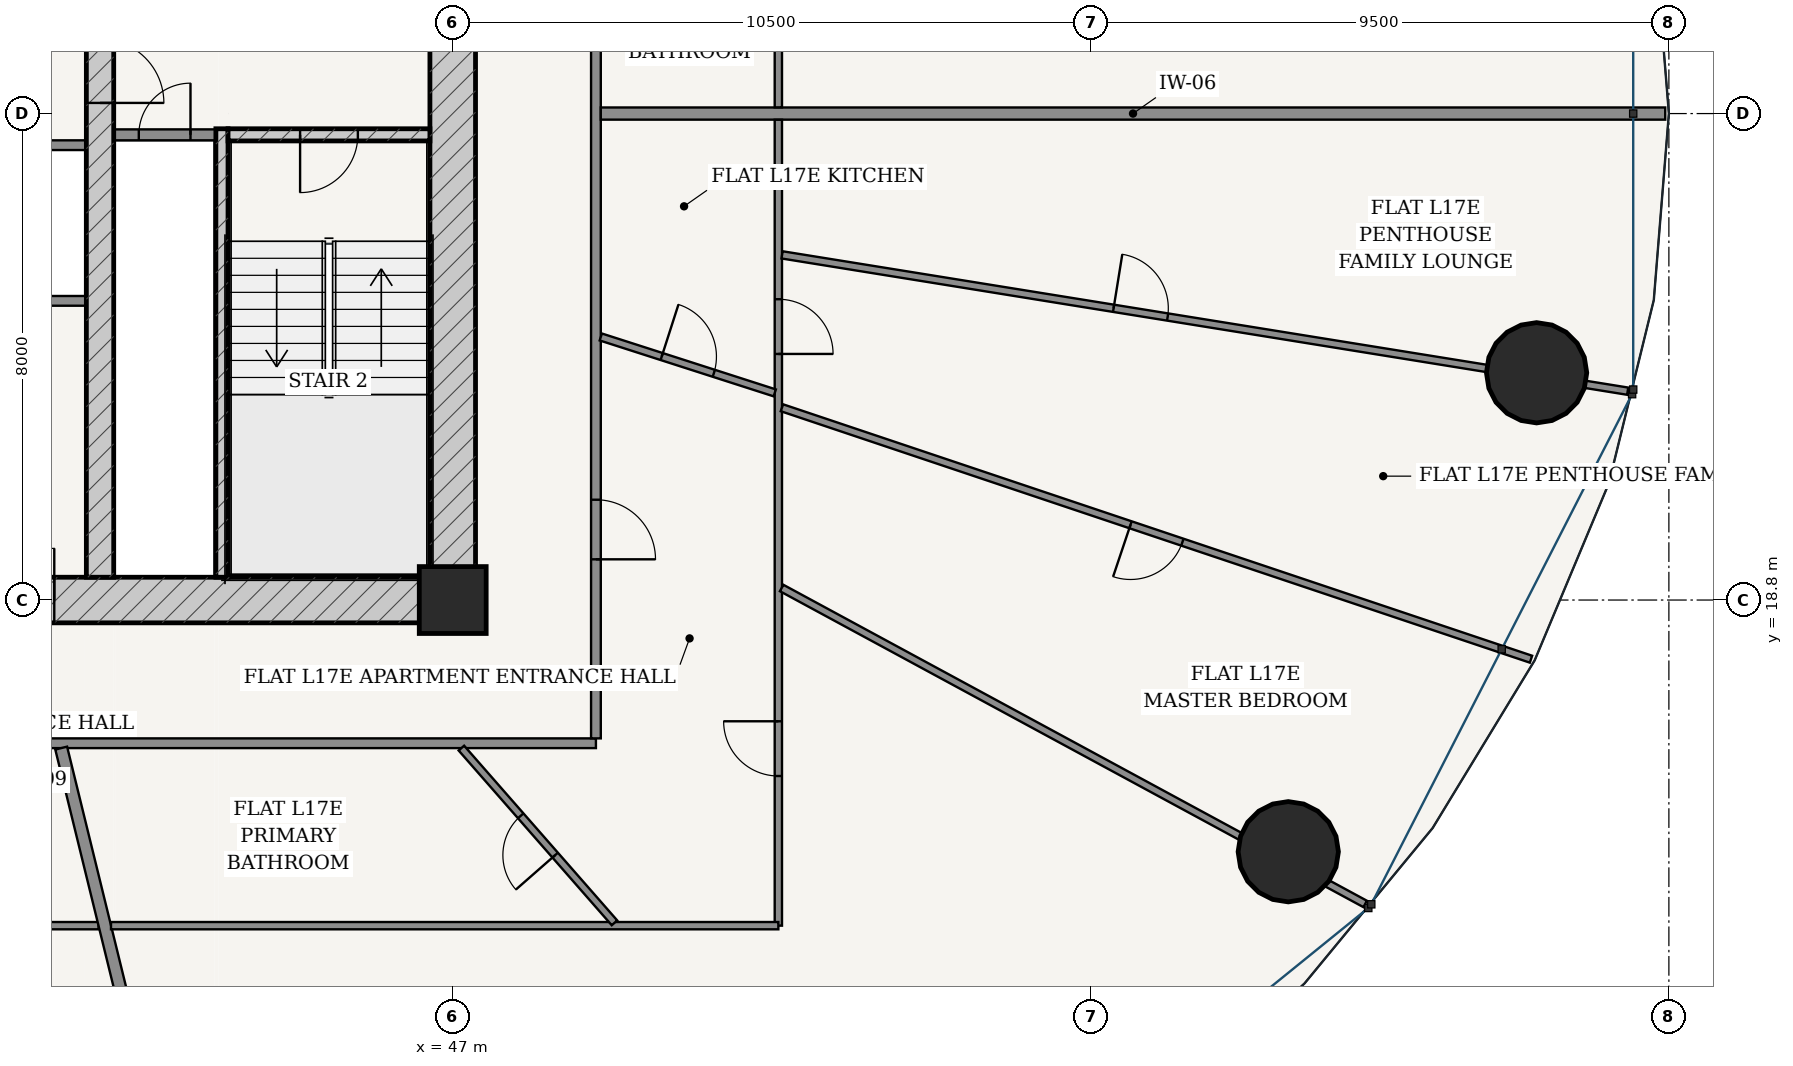
"""IFC4 building model, lengths in metres.
Left out: names, types, materials, properties, quantities, classifications, styles, units other than length and angle.
Written with IfcOpenShell. Run it as: python <this file> out.ifc"""

import sys

from ifc_helpers import new_model, si_unit, direction, frame, frame_2d, origin, origin_2d, place, context, subcontext, project, spatial, rectangle, hollow_circle, extrude, source, transform, mapped, element, fill, save


model = new_model("IFC4")
c1 = context("Model", 3, precision=1e-05, world=origin(), true_north=direction((-0.2419218956, 0.970295726276)))
c2 = subcontext(c1, "Body", "Model", "MODEL_VIEW")
j1 = project(units=[si_unit("LENGTHUNIT", "METRE"), si_unit("PLANEANGLEUNIT", "RADIAN")], contexts=[c1])
p1 = place(None, origin())
s1 = spatial("IfcSite", under=j1, at=p1, CompositionType="ELEMENT")
p2 = place(p1, origin())
s2 = spatial("IfcBuilding", under=s1, at=p2, CompositionType="ELEMENT")
p3 = place(p2, frame((0.0, 0.0, 67.2)))
s3 = spatial("IfcBuildingStorey", under=s2, at=p3, CompositionType="ELEMENT", Elevation=67.2)
p4 = place(p3, frame((47.0, 18.8, 0.0), z_axis=(0.0, 0.0, 1.0), x_axis=(1.0, 0.0, 0.0)))
e1 = element("IfcColumn", 1, at=p4, inside=s3, PredefinedType="COLUMN", context=c2, shape_type="SweptSolid", body=[
    extrude(rectangle(XDim=1.1, YDim=1.1, at=origin_2d()), origin(), (0.0, 0.0, 1.0), 3.6),
])
p5 = place(p3, frame((28.625, 18.8, 0.0), z_axis=(0.0, 0.0, 1.0), x_axis=(1.0, 0.0, 0.0)))
e2 = element("IfcWall", 2, at=p5, inside=s3, PredefinedType="SHEAR", context=c2, shape_type="SweptSolid", body=[
    extrude(rectangle(XDim=18.75, YDim=0.75, at=frame_2d((9.375, 0.0))), origin(), (0.0, 0.0, 1.0), 3.32),
])
p6 = place(p5, frame((6.927, 0.0, 0.0)))
e3 = element("IfcOpeningElement", 3, at=p6, cuts=e2, PredefinedType="OPENING", context=c2, shape_type="SweptSolid", body=[
    extrude(rectangle(XDim=0.85, YDim=2.1, at=frame_2d((0.425, 1.05))), frame((0.0, 0.385, 0.0), z_axis=(0.0, -1.0, 0.0), x_axis=(1.0, 0.0, 0.0)), (0.0, 0.0, 1.0), 0.77),
])
p7 = place(p5, frame((8.95, 0.0, 0.0)))
e4 = element("IfcOpeningElement", 4, at=p7, cuts=e2, PredefinedType="OPENING", context=c2, shape_type="SweptSolid", body=[
    extrude(rectangle(XDim=0.85, YDim=2.1, at=frame_2d((0.425, 1.05))), frame((0.0, 0.385, 0.0), z_axis=(0.0, -1.0, 0.0), x_axis=(1.0, 0.0, 0.0)), (0.0, 0.0, 1.0), 0.77),
])
p8 = place(p5, frame((10.972, 0.0, 0.0)))
e5 = element("IfcOpeningElement", 5, at=p8, cuts=e2, PredefinedType="OPENING", context=c2, shape_type="SweptSolid", body=[
    extrude(rectangle(XDim=0.85, YDim=2.1, at=frame_2d((0.425, 1.05))), frame((0.0, 0.385, 0.0), z_axis=(0.0, -1.0, 0.0), x_axis=(1.0, 0.0, 0.0)), (0.0, 0.0, 1.0), 0.77),
])
p9 = place(p3, frame((47.0, 19.175, 0.0), z_axis=(0.0, 0.0, 1.0), x_axis=(0.0, 1.0, 0.0)))
e6 = element("IfcWall", 6, at=p9, inside=s3, PredefinedType="SHEAR", context=c2, shape_type="SweptSolid", body=[
    extrude(rectangle(XDim=15.25, YDim=0.75, at=frame_2d((7.625, 0.0))), origin(), (0.0, 0.0, 1.0), 3.32),
])
p10 = place(p9, frame((9.875, 0.0, 0.0)))
e7 = element("IfcOpeningElement", 7, at=p10, cuts=e6, PredefinedType="OPENING", context=c2, shape_type="SweptSolid", body=[
    extrude(rectangle(XDim=1.5, YDim=2.2, at=frame_2d((0.75, 1.1))), frame((0.0, 0.385, 0.0), z_axis=(0.0, -1.0, 0.0), x_axis=(1.0, 0.0, 0.0)), (0.0, 0.0, 1.0), 0.77),
])
p11 = place(p3, frame((43.205, 19.175, 0.0), z_axis=(0.0, 0.0, 1.0), x_axis=(0.0, 1.0, 0.0)))
e8 = element("IfcWall", 8, at=p11, inside=s3, PredefinedType="SOLIDWALL", context=c2, shape_type="SweptSolid", body=[
    extrude(rectangle(XDim=7.375, YDim=0.2, at=frame_2d((3.688, 0.0))), origin(), (0.0, 0.0, 1.0), 3.32),
])
p12 = place(p3, frame((43.305, 26.45, 0.0), z_axis=(0.0, 0.0, 1.0), x_axis=(1.0, 0.0, 0.0)))
e9 = element("IfcWall", 9, at=p12, inside=s3, PredefinedType="SOLIDWALL", context=c2, shape_type="SweptSolid", body=[
    extrude(rectangle(XDim=3.32, YDim=0.2, at=frame_2d((1.66, 0.0))), origin(), (0.0, 0.0, 1.0), 3.32),
])
p13 = place(p12, frame((1.185, 0.0, 0.0)))
e10 = element("IfcOpeningElement", 10, at=p13, cuts=e9, PredefinedType="OPENING", context=c2, shape_type="SweptSolid", body=[
    extrude(rectangle(XDim=0.95, YDim=2.15, at=frame_2d((0.475, 1.075))), frame((0.0, 0.11, 0.0), z_axis=(0.0, -1.0, 0.0), x_axis=(1.0, 0.0, 0.0)), (0.0, 0.0, 1.0), 0.22),
])
p14 = place(p3, frame((41.2, 19.175, 0.0), z_axis=(0.0, 0.0, 1.0), x_axis=(0.0, 1.0, 0.0)))
e11 = element("IfcWall", 11, at=p14, inside=s3, PredefinedType="SHEAR", context=c2, shape_type="SweptSolid", body=[
    extrude(rectangle(XDim=15.25, YDim=0.45, at=frame_2d((7.625, 0.0))), origin(), (0.0, 0.0, 1.0), 3.32),
])
p15 = place(p14, frame((7.8, 0.0, 0.0)))
e12 = element("IfcOpeningElement", 12, at=p15, cuts=e11, PredefinedType="OPENING", context=c2, shape_type="SweptSolid", body=[
    extrude(rectangle(XDim=1.05, YDim=2.15, at=frame_2d((0.525, 1.075))), frame((0.0, 0.235, 0.0), z_axis=(0.0, -1.0, 0.0), x_axis=(1.0, 0.0, 0.0)), (0.0, 0.0, 1.0), 0.47),
])
for number, where, z_axis, x_axis in (
    (13, (60.741, 14.661, 0.0), (0.0, 0.0, 1.0), (1.0, 0.0, 0.0)),
    (14, (64.824, 22.537, 0.0), (0.0, 0.0, 1.0), (1.0, 0.0, 0.0)),
):
    element("IfcColumn", number, at=place(p3, frame(where, z_axis=z_axis, x_axis=x_axis)), inside=s3, PredefinedType="COLUMN", context=c2, shape_type="SweptSolid", body=[
        extrude(hollow_circle(Radius=0.825, WallThickness=0.05, at=origin_2d()), origin(), (0.0, 0.0, 1.0), 3.6),
    ])
p16 = place(p3, frame((41.425, 26.45, 0.0), z_axis=(0.0, 0.0, 1.0), x_axis=(1.0, 0.0, 0.0)))
e15 = element("IfcWall", 15, at=p16, inside=s3, PredefinedType="PARTITIONING", context=c2, shape_type="SweptSolid", body=[
    extrude(rectangle(XDim=1.675, YDim=0.18, at=frame_2d((0.837, 0.0))), origin(), (0.0, 0.0, 1.0), 3.32),
])
p17 = place(p16, frame((0.413, 0.0, 0.0)))
e16 = element("IfcOpeningElement", 16, at=p17, cuts=e15, PredefinedType="OPENING", context=c2, shape_type="SweptSolid", body=[
    extrude(rectangle(XDim=0.85, YDim=2.1, at=frame_2d((0.425, 1.05))), frame((0.0, 0.1, 0.0), z_axis=(0.0, -1.0, 0.0), x_axis=(1.0, 0.0, 0.0)), (0.0, 0.0, 1.0), 0.2),
])
for number, where, z_axis, x_axis in (
    (17, (35.025, 26.28, 0.0), (0.0, 0.0, 1.0), (1.0, 0.0, 0.0)),
    (18, (35.025, 23.72, 0.0), (0.0, 0.0, 1.0), (1.0, 0.0, 0.0)),
):
    element("IfcWall", number, at=place(p3, frame(where, z_axis=z_axis, x_axis=x_axis)), inside=s3, PredefinedType="PARTITIONING", context=c2, shape_type="SweptSolid", body=[
        extrude(rectangle(XDim=5.95, YDim=0.16, at=frame_2d((2.975, 0.0))), origin(), (0.0, 0.0, 1.0), 3.32),
    ])
p18 = place(p3, frame((26.645, 16.445, 0.0), z_axis=(0.0, 0.0, 1.0), x_axis=(1.0, 0.0, 0.0)))
e19 = element("IfcWall", 19, at=p18, inside=s3, PredefinedType="PARTITIONING", context=c2, shape_type="SweptSolid", body=[
    extrude(rectangle(XDim=22.71, YDim=0.16, at=frame_2d((11.355, 0.0))), origin(), (0.0, 0.0, 1.0), 2.688),
])
p19 = place(p18, frame((5.419, 0.0, 0.0)))
e20 = element("IfcOpeningElement", 20, at=p19, cuts=e19, PredefinedType="OPENING", context=c2, shape_type="SweptSolid", body=[
    extrude(rectangle(XDim=0.98, YDim=2.2, at=frame_2d((0.49, 1.1))), frame((0.0, 0.09, 0.0), z_axis=(0.0, -1.0, 0.0), x_axis=(1.0, 0.0, 0.0)), (0.0, 0.0, 1.0), 0.18),
])
p20 = place(p3, frame((49.355, 16.525, 0.0), z_axis=(0.0, 0.0, 1.0), x_axis=(0.0, 1.0, 0.0)))
e21 = element("IfcWall", 21, at=p20, inside=s3, PredefinedType="PARTITIONING", context=c2, shape_type="SweptSolid", body=[
    extrude(rectangle(XDim=20.55, YDim=0.16, at=frame_2d((10.275, 0.0))), origin(), (0.0, 0.0, 1.0), 2.688),
])
p21 = place(p20, frame((16.537, 0.0, 0.0)))
e22 = element("IfcOpeningElement", 22, at=p21, cuts=e21, PredefinedType="OPENING", context=c2, shape_type="SweptSolid", body=[
    extrude(rectangle(XDim=0.98, YDim=2.2, at=frame_2d((0.49, 1.1))), frame((0.0, 0.09, 0.0), z_axis=(0.0, -1.0, 0.0), x_axis=(1.0, 0.0, 0.0)), (0.0, 0.0, 1.0), 0.18),
])
p22 = place(p20, frame((2.945, 0.0, 0.0)))
e23 = element("IfcOpeningElement", 23, at=p22, cuts=e21, PredefinedType="OPENING", context=c2, shape_type="SweptSolid", body=[
    extrude(rectangle(XDim=0.98, YDim=2.2, at=frame_2d((0.49, 1.1))), frame((0.0, 0.09, 0.0), z_axis=(0.0, -1.0, 0.0), x_axis=(1.0, 0.0, 0.0)), (0.0, 0.0, 1.0), 0.18),
])
p23 = place(p3, frame((49.435, 26.8, 0.0), z_axis=(0.0, 0.0, 1.0), x_axis=(1.0, 0.0, 0.0)))
e24 = element("IfcWall", 24, at=p23, inside=s3, PredefinedType="PARTITIONING", context=c2, shape_type="SweptSolid", body=[
    extrude(rectangle(XDim=17.505, YDim=0.2, at=frame_2d((8.752, 0.0))), origin(), (0.0, 0.0, 1.0), 2.762),
])
p24 = place(p3, frame((52.355, 40.155, 0.0), z_axis=(0.0, 0.0, 1.0), x_axis=(0.0, -1.0, 0.0)))
e25 = element("IfcWall", 25, at=p24, inside=s3, PredefinedType="PARTITIONING", context=c2, shape_type="SweptSolid", body=[
    extrude(rectangle(XDim=13.253, YDim=0.12, at=frame_2d((6.626, 0.0))), origin(), (0.0, 0.0, 1.0), 2.688),
])
p25 = place(p24, frame((6.853, 0.0, 0.0)))
e26 = element("IfcOpeningElement", 26, at=p25, cuts=e25, PredefinedType="OPENING", context=c2, shape_type="SweptSolid", body=[
    extrude(rectangle(XDim=0.9, YDim=2.15, at=frame_2d((0.45, 1.075))), frame((0.0, 0.07, 0.0), z_axis=(0.0, -1.0, 0.0), x_axis=(1.0, 0.0, 0.0)), (0.0, 0.0, 1.0), 0.14),
])
p26 = place(p3, frame((41.176, 13.445, 0.0), z_axis=(0.0, 0.0, 1.0), x_axis=(-1.0, 0.0, 0.0)))
e27 = element("IfcWall", 27, at=p26, inside=s3, PredefinedType="PARTITIONING", context=c2, shape_type="SweptSolid", body=[
    extrude(rectangle(XDim=17.531, YDim=0.12, at=frame_2d((8.766, 0.0))), origin(), (0.0, 0.0, 1.0), 2.688),
])
p27 = place(p26, frame((10.299, 0.0, 0.0)))
e28 = element("IfcOpeningElement", 28, at=p27, cuts=e27, PredefinedType="OPENING", context=c2, shape_type="SweptSolid", body=[
    extrude(rectangle(XDim=0.9, YDim=2.15, at=frame_2d((0.45, 1.075))), frame((0.0, 0.07, 0.0), z_axis=(0.0, -1.0, 0.0), x_axis=(1.0, 0.0, 0.0)), (0.0, 0.0, 1.0), 0.14),
])
p28 = place(p26, frame((1.258, 0.0, 0.0)))
e29 = element("IfcOpeningElement", 29, at=p28, cuts=e27, PredefinedType="OPENING", context=c2, shape_type="SweptSolid", body=[
    extrude(rectangle(XDim=0.9, YDim=2.15, at=frame_2d((0.45, 1.075))), frame((0.0, 0.07, 0.0), z_axis=(0.0, -1.0, 0.0), x_axis=(1.0, 0.0, 0.0)), (0.0, 0.0, 1.0), 0.14),
])
p29 = place(p3, frame((40.562, 16.365, 0.0), z_axis=(0.0, 0.0, 1.0), x_axis=(0.238380116209, -0.971171931326, 0.0)))
e30 = element("IfcWall", 30, at=p29, inside=s3, PredefinedType="PARTITIONING", context=c2, shape_type="SweptSolid", body=[
    extrude(rectangle(XDim=12.877, YDim=0.2, at=frame_2d((6.438, 0.0))), origin(), (0.0, 0.0, 1.0), 2.688),
])
p30 = place(p3, frame((52.355, 26.698, 0.0), z_axis=(0.0, 0.0, 1.0), x_axis=(0.0, -1.0, 0.0)))
e31 = element("IfcWall", 31, at=p30, inside=s3, PredefinedType="PARTITIONING", context=c2, shape_type="SweptSolid", body=[
    extrude(rectangle(XDim=13.253, YDim=0.12, at=frame_2d((6.626, 0.0))), origin(), (0.0, 0.0, 1.0), 2.688),
])
p31 = place(p30, frame((9.892, 0.0, 0.0)))
e32 = element("IfcOpeningElement", 32, at=p31, cuts=e31, PredefinedType="OPENING", context=c2, shape_type="SweptSolid", body=[
    extrude(rectangle(XDim=0.9, YDim=2.15, at=frame_2d((0.45, 1.075))), frame((0.0, 0.07, 0.0), z_axis=(0.0, -1.0, 0.0), x_axis=(1.0, 0.0, 0.0)), (0.0, 0.0, 1.0), 0.14),
])
p32 = place(p30, frame((2.951, 0.0, 0.0)))
e33 = element("IfcOpeningElement", 33, at=p32, cuts=e31, PredefinedType="OPENING", context=c2, shape_type="SweptSolid", body=[
    extrude(rectangle(XDim=0.9, YDim=2.15, at=frame_2d((0.45, 1.075))), frame((0.0, 0.07, 0.0), z_axis=(0.0, -1.0, 0.0), x_axis=(1.0, 0.0, 0.0)), (0.0, 0.0, 1.0), 0.14),
])
p33 = place(p3, frame((52.355, 13.445, 0.0), z_axis=(0.0, 0.0, 1.0), x_axis=(-1.0, 0.0, 0.0)))
e34 = element("IfcWall", 34, at=p33, inside=s3, PredefinedType="PARTITIONING", context=c2, shape_type="SweptSolid", body=[
    extrude(rectangle(XDim=10.975, YDim=0.12, at=frame_2d((5.487, 0.0))), origin(), (0.0, 0.0, 1.0), 2.688),
])
p34 = place(p3, frame((52.409, 18.998, 0.0), z_axis=(0.0, 0.0, 1.0), x_axis=(0.879373936002, -0.476131789193, 0.0)))
e35 = element("IfcWall", 35, at=p34, inside=s3, PredefinedType="PARTITIONING", context=c2, shape_type="SweptSolid", body=[
    extrude(rectangle(XDim=10.913, YDim=0.12, at=frame_2d((5.456, 0.0))), origin(), (0.0, 0.0, 1.0), 2.688),
])
p35 = place(p3, frame((52.414, 21.962, 0.0), z_axis=(0.0, 0.0, 1.0), x_axis=(0.948021751459, -0.318205529118, 0.0)))
e36 = element("IfcWall", 36, at=p35, inside=s3, PredefinedType="PARTITIONING", context=c2, shape_type="SweptSolid", body=[
    extrude(rectangle(XDim=12.994, YDim=0.12, at=frame_2d((6.497, 0.0))), origin(), (0.0, 0.0, 1.0), 2.762),
])
p36 = place(p35, frame((6.047, 0.0, 0.0)))
e37 = element("IfcOpeningElement", 37, at=p36, cuts=e36, PredefinedType="OPENING", context=c2, shape_type="SweptSolid", body=[
    extrude(rectangle(XDim=0.9, YDim=2.15, at=frame_2d((0.45, 1.075))), frame((0.0, 0.07, 0.0), z_axis=(0.0, -1.0, 0.0), x_axis=(1.0, 0.0, 0.0)), (0.0, 0.0, 1.0), 0.14),
])
p37 = place(p3, frame((52.416, 24.476, 0.0), z_axis=(0.0, 0.0, 1.0), x_axis=(0.987257727093, -0.159129445092, 0.0)))
e38 = element("IfcWall", 38, at=p37, inside=s3, PredefinedType="PARTITIONING", context=c2, shape_type="SweptSolid", body=[
    extrude(rectangle(XDim=14.086, YDim=0.12, at=frame_2d((7.043, 0.0))), origin(), (0.0, 0.0, 1.0), 2.688),
])
p38 = place(p37, frame((5.522, 0.0, 0.0)))
e39 = element("IfcOpeningElement", 39, at=p38, cuts=e38, PredefinedType="OPENING", context=c2, shape_type="SweptSolid", body=[
    extrude(rectangle(XDim=0.9, YDim=2.15, at=frame_2d((0.45, 1.075))), frame((0.0, 0.07, 0.0), z_axis=(0.0, -1.0, 0.0), x_axis=(1.0, 0.0, 0.0)), (0.0, 0.0, 1.0), 0.14),
])
p39 = place(p3, frame((47.143, 16.365, 0.0), z_axis=(0.0, 0.0, 1.0), x_axis=(0.659015717138, -0.752129167474, 0.0)))
e40 = element("IfcWall", 40, at=p39, inside=s3, PredefinedType="PARTITIONING", context=c2, shape_type="SweptSolid", body=[
    extrude(rectangle(XDim=3.82, YDim=0.12, at=frame_2d((1.91, 0.0))), origin(), (0.0, 0.0, 1.0), 2.999),
])
p40 = place(p39, frame((1.48, 0.0, 0.0)))
e41 = element("IfcOpeningElement", 41, at=p40, cuts=e40, PredefinedType="OPENING", context=c2, shape_type="SweptSolid", body=[
    extrude(rectangle(XDim=0.86, YDim=2.15, at=frame_2d((0.43, 1.075))), frame((0.0, 0.07, 0.0), z_axis=(0.0, -1.0, 0.0), x_axis=(1.0, 0.0, 0.0)), (0.0, 0.0, 1.0), 0.14),
])
p41 = place(p3, frame((49.435, 23.126, 0.0), z_axis=(0.0, 0.0, 1.0), x_axis=(0.952040395248, -0.305972361197, 0.0)))
e42 = element("IfcWall", 42, at=p41, inside=s3, PredefinedType="PARTITIONING", context=c2, shape_type="SweptSolid", body=[
    extrude(rectangle(XDim=3.005, YDim=0.12, at=frame_2d((1.502, 0.0))), origin(), (0.0, 0.0, 1.0), 3.32),
])
p42 = place(p41, frame((1.052, 0.0, 0.0)))
e43 = element("IfcOpeningElement", 43, at=p42, cuts=e42, PredefinedType="OPENING", context=c2, shape_type="SweptSolid", body=[
    extrude(rectangle(XDim=0.9, YDim=2.15, at=frame_2d((0.45, 1.075))), frame((0.0, 0.07, 0.0), z_axis=(0.0, -1.0, 0.0), x_axis=(1.0, 0.0, 0.0)), (0.0, 0.0, 1.0), 0.14),
])
m1 = source(origin(), c2, "Body", "SweptSolid", [
    extrude(rectangle(XDim=1.05, YDim=2.15, at=frame_2d((0.525, 1.075))), frame((0.0, 0.025, 0.0), z_axis=(0.0, -1.0, 0.0), x_axis=(1.0, 0.0, 0.0)), (0.0, 0.0, 1.0), 0.05),
])
p43 = place(p15, frame((1.05, 0.0, 0.0), z_axis=(0.0, 0.0, 1.0), x_axis=(-1.0, 0.0, 0.0)))
e44 = element("IfcDoor", 44, at=p43, inside=s3, OperationType="SINGLE_SWING_RIGHT", PredefinedType="DOOR", context=c2, shape_type="MappedRepresentation", body=[
    mapped(m1, transform((0.0, 0.0, 0.0), scale=1.0)),
])
fill(e12, e44)
m2 = source(origin(), c2, "Body", "SweptSolid", [
    extrude(rectangle(XDim=0.95, YDim=2.15, at=frame_2d((0.475, 1.075))), frame((0.0, 0.025, 0.0), z_axis=(0.0, -1.0, 0.0), x_axis=(1.0, 0.0, 0.0)), (0.0, 0.0, 1.0), 0.05),
])
p44 = place(p13, frame((0.95, 0.0, 0.0), z_axis=(0.0, 0.0, 1.0), x_axis=(-1.0, 0.0, 0.0)))
e45 = element("IfcDoor", 45, at=p44, inside=s3, OperationType="SINGLE_SWING_RIGHT", PredefinedType="DOOR", context=c2, shape_type="MappedRepresentation", body=[
    mapped(m2, transform((0.0, 0.0, 0.0), scale=1.0)),
])
fill(e10, e45)
m3 = source(origin(), c2, "Body", "SweptSolid", [
    extrude(rectangle(XDim=0.85, YDim=2.1, at=frame_2d((0.425, 1.05))), frame((0.0, 0.025, 0.0), z_axis=(0.0, -1.0, 0.0), x_axis=(1.0, 0.0, 0.0)), (0.0, 0.0, 1.0), 0.05),
])
p45 = place(p17, origin())
e46 = element("IfcDoor", 46, at=p45, inside=s3, OperationType="SINGLE_SWING_RIGHT", PredefinedType="DOOR", context=c2, shape_type="MappedRepresentation", body=[
    mapped(m3, transform((0.0, 0.0, 0.0), scale=1.0)),
])
fill(e16, e46)
p46 = place(p8, origin())
e47 = element("IfcDoor", 47, at=p46, inside=s3, OperationType="SINGLE_SWING_RIGHT", PredefinedType="DOOR", context=c2, shape_type="MappedRepresentation", body=[
    mapped(m3, transform((0.0, 0.0, 0.0), scale=1.0)),
])
fill(e5, e47)
m4 = source(origin(), c2, "Body", "SweptSolid", [
    extrude(rectangle(XDim=0.98, YDim=2.2, at=frame_2d((0.49, 1.1))), frame((0.0, 0.025, 0.0), z_axis=(0.0, -1.0, 0.0), x_axis=(1.0, 0.0, 0.0)), (0.0, 0.0, 1.0), 0.05),
])
p47 = place(p22, frame((0.98, 0.0, 0.0), z_axis=(0.0, 0.0, 1.0), x_axis=(-1.0, 0.0, 0.0)))
e48 = element("IfcDoor", 48, at=p47, inside=s3, OperationType="SINGLE_SWING_RIGHT", PredefinedType="DOOR", context=c2, shape_type="MappedRepresentation", body=[
    mapped(m4, transform((0.0, 0.0, 0.0), scale=1.0)),
])
fill(e23, e48)
m5 = source(origin(), c2, "Body", "SweptSolid", [
    extrude(rectangle(XDim=0.86, YDim=2.15, at=frame_2d((0.43, 1.075))), frame((0.0, 0.025, 0.0), z_axis=(0.0, -1.0, 0.0), x_axis=(1.0, 0.0, 0.0)), (0.0, 0.0, 1.0), 0.05),
])
p48 = place(p40, frame((0.86, 0.0, 0.0), z_axis=(0.0, 0.0, 1.0), x_axis=(-1.0, 0.0, 0.0)))
e49 = element("IfcDoor", 49, at=p48, inside=s3, OperationType="SINGLE_SWING_LEFT", PredefinedType="DOOR", context=c2, shape_type="MappedRepresentation", body=[
    mapped(m5, transform((0.0, 0.0, 0.0), scale=1.0)),
])
fill(e41, e49)
m6 = source(origin(), c2, "Body", "SweptSolid", [
    extrude(rectangle(XDim=0.9, YDim=2.15, at=frame_2d((0.45, 1.075))), frame((0.0, 0.025, 0.0), z_axis=(0.0, -1.0, 0.0), x_axis=(1.0, 0.0, 0.0)), (0.0, 0.0, 1.0), 0.05),
])
p49 = place(p31, frame((0.9, 0.0, 0.0), z_axis=(0.0, 0.0, 1.0), x_axis=(-1.0, 0.0, 0.0)))
e50 = element("IfcDoor", 50, at=p49, inside=s3, OperationType="SINGLE_SWING_RIGHT", PredefinedType="DOOR", context=c2, shape_type="MappedRepresentation", body=[
    mapped(m6, transform((0.0, 0.0, 0.0), scale=1.0)),
])
fill(e32, e50)
p50 = place(p42, origin())
e51 = element("IfcDoor", 51, at=p50, inside=s3, OperationType="SINGLE_SWING_LEFT", PredefinedType="DOOR", context=c2, shape_type="MappedRepresentation", body=[
    mapped(m6, transform((0.0, 0.0, 0.0), scale=1.0)),
])
fill(e43, e51)
p51 = place(p32, origin())
e52 = element("IfcDoor", 52, at=p51, inside=s3, OperationType="SINGLE_SWING_RIGHT", PredefinedType="DOOR", context=c2, shape_type="MappedRepresentation", body=[
    mapped(m6, transform((0.0, 0.0, 0.0), scale=1.0)),
])
fill(e33, e52)
p52 = place(p38, origin())
e53 = element("IfcDoor", 53, at=p52, inside=s3, OperationType="SINGLE_SWING_LEFT", PredefinedType="DOOR", context=c2, shape_type="MappedRepresentation", body=[
    mapped(m6, transform((0.0, 0.0, 0.0), scale=1.0)),
])
fill(e39, e53)
p53 = place(p36, frame((0.9, 0.0, 0.0), z_axis=(0.0, 0.0, 1.0), x_axis=(-1.0, 0.0, 0.0)))
e54 = element("IfcDoor", 54, at=p53, inside=s3, OperationType="SINGLE_SWING_RIGHT", PredefinedType="DOOR", context=c2, shape_type="MappedRepresentation", body=[
    mapped(m6, transform((0.0, 0.0, 0.0), scale=1.0)),
])
fill(e37, e54)
save(model, sys.argv[1])
